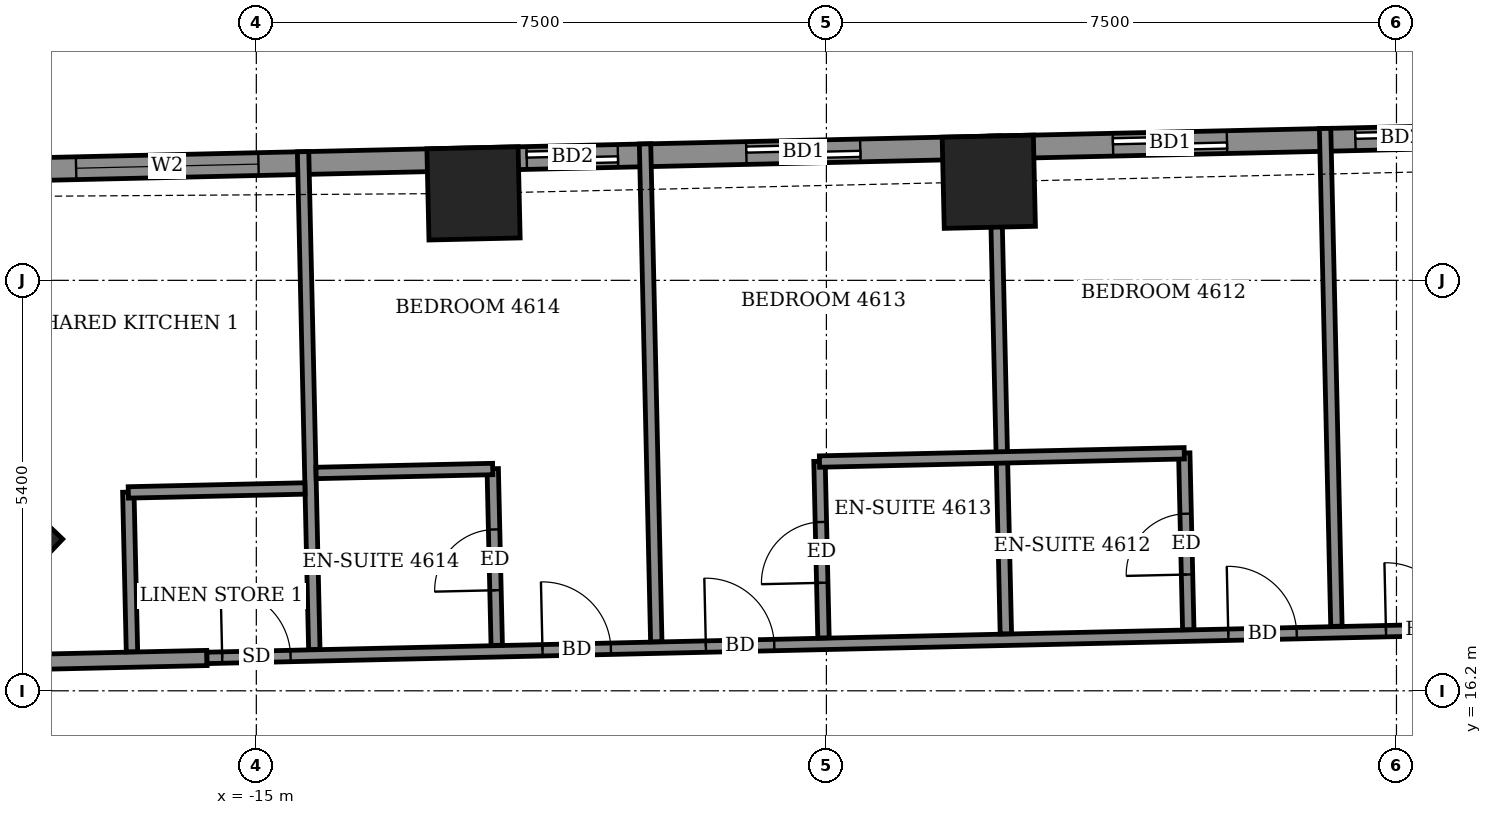
"""IFC4 building model, lengths in metres.
Left out: names, types, materials, properties, quantities, classifications, styles, units other than length and angle.
Written with IfcOpenShell. Run it as: python <this file> out.ifc"""

import sys

from ifc_helpers import new_model, si_unit, direction, frame, frame_2d, origin, origin_2d, place, context, subcontext, project, spatial, rectangle, extrude, element, fill, save


model = new_model("IFC4")
c1 = context("Model", 3, precision=1e-05, world=origin(), true_north=direction((0.0, 1.0)))
c2 = subcontext(c1, "Body", "Model", "MODEL_VIEW")
j1 = project(units=[si_unit("LENGTHUNIT", "METRE"), si_unit("PLANEANGLEUNIT", "RADIAN")], contexts=[c1])
p1 = place(None, origin())
s1 = spatial("IfcSite", under=j1, at=p1, CompositionType="ELEMENT")
p2 = place(p1, origin())
s2 = spatial("IfcBuilding", under=s1, at=p2, CompositionType="ELEMENT")
p3 = place(p2, frame((0.0, 0.0, 182.5)))
s3 = spatial("IfcBuildingStorey", under=s2, at=p3, CompositionType="ELEMENT", Elevation=182.5)
for number, where, z_axis, x_axis in (
    (1, (-5.364, 22.897, -0.55), (0.0, 0.0, 1.0), (-1.0, -0.023, 0.0)),
    (2, (-12.142, 22.744, -0.55), (0.0, 0.0, 1.0), (-1.0, -0.023, 0.0)),
    (3, (-18.396, 18.177, -0.55), (0.0, 0.0, 1.0), (-0.691, -0.723, 0.0)),
):
    element("IfcColumn", number, at=place(p3, frame(where, z_axis=z_axis, x_axis=x_axis)), inside=s3, PredefinedType="COLUMN", context=c2, shape_type="SweptSolid", body=[
        extrude(rectangle(XDim=1.2, YDim=1.2, at=origin_2d()), origin(), (0.0, 0.0, 1.0), 3.6),
    ])
p4 = place(p3, frame((21.589, 23.959, 0.0), z_axis=(0.0, 0.0, 1.0), x_axis=(-0.999742671382, -0.022684598702, 0.0)))
e4 = element("IfcWall", 4, at=p4, inside=s3, PredefinedType="SOLIDWALL", context=c2, shape_type="SweptSolid", body=[
    extrude(rectangle(XDim=40.381, YDim=0.3, at=frame_2d((20.19, 0.0))), origin(), (0.0, 0.0, 1.0), 3.05),
])
p5 = place(p4, frame((1.853, 0.0, 0.0)))
e5 = element("IfcOpeningElement", 5, at=p5, cuts=e4, PredefinedType="OPENING", context=c2, shape_type="SweptSolid", body=[
    extrude(rectangle(XDim=1.5, YDim=2.4, at=frame_2d((0.75, 1.2))), frame((0.0, 0.16, 0.0), z_axis=(0.0, -1.0, 0.0), x_axis=(1.0, 0.0, 0.0)), (0.0, 0.0, 1.0), 0.32),
])
p6 = place(p4, frame((7.38, 0.0, 0.0)))
e6 = element("IfcOpeningElement", 6, at=p6, cuts=e4, PredefinedType="OPENING", context=c2, shape_type="SweptSolid", body=[
    extrude(rectangle(XDim=1.2, YDim=2.4, at=frame_2d((0.6, 1.2))), frame((0.0, 0.16, 0.0), z_axis=(0.0, -1.0, 0.0), x_axis=(1.0, 0.0, 0.0)), (0.0, 0.0, 1.0), 0.32),
])
p7 = place(p4, frame((10.27, 0.0, 0.0)))
e7 = element("IfcOpeningElement", 7, at=p7, cuts=e4, PredefinedType="OPENING", context=c2, shape_type="SweptSolid", body=[
    extrude(rectangle(XDim=1.5, YDim=2.4, at=frame_2d((0.75, 1.2))), frame((0.0, 0.16, 0.0), z_axis=(0.0, -1.0, 0.0), x_axis=(1.0, 0.0, 0.0)), (0.0, 0.0, 1.0), 0.32),
])
p8 = place(p4, frame((15.095, 0.0, 0.0)))
e8 = element("IfcOpeningElement", 8, at=p8, cuts=e4, PredefinedType="OPENING", context=c2, shape_type="SweptSolid", body=[
    extrude(rectangle(XDim=1.5, YDim=2.4, at=frame_2d((0.75, 1.2))), frame((0.0, 0.16, 0.0), z_axis=(0.0, -1.0, 0.0), x_axis=(1.0, 0.0, 0.0)), (0.0, 0.0, 1.0), 0.32),
])
p9 = place(p4, frame((20.935, 0.0, 0.0)))
e9 = element("IfcOpeningElement", 9, at=p9, cuts=e4, PredefinedType="OPENING", context=c2, shape_type="SweptSolid", body=[
    extrude(rectangle(XDim=1.2, YDim=2.4, at=frame_2d((0.6, 1.2))), frame((0.0, 0.16, 0.0), z_axis=(0.0, -1.0, 0.0), x_axis=(1.0, 0.0, 0.0)), (0.0, 0.0, 1.0), 0.32),
])
p10 = place(p4, frame((23.825, 0.0, 0.0)))
e10 = element("IfcOpeningElement", 10, at=p10, cuts=e4, PredefinedType="OPENING", context=c2, shape_type="SweptSolid", body=[
    extrude(rectangle(XDim=1.5, YDim=2.4, at=frame_2d((0.75, 1.2))), frame((0.0, 0.16, 0.0), z_axis=(0.0, -1.0, 0.0), x_axis=(1.0, 0.0, 0.0)), (0.0, 0.0, 1.0), 0.32),
])
p11 = place(p4, frame((28.65, 0.0, 0.0)))
e11 = element("IfcOpeningElement", 11, at=p11, cuts=e4, PredefinedType="OPENING", context=c2, shape_type="SweptSolid", body=[
    extrude(rectangle(XDim=1.5, YDim=2.4, at=frame_2d((0.75, 1.2))), frame((0.0, 0.16, 0.0), z_axis=(0.0, -1.0, 0.0), x_axis=(1.0, 0.0, 0.0)), (0.0, 0.0, 1.0), 0.32),
])
p12 = place(p4, frame((31.84, 0.0, 0.0)))
e12 = element("IfcOpeningElement", 12, at=p12, cuts=e4, PredefinedType="OPENING", context=c2, shape_type="SweptSolid", body=[
    extrude(rectangle(XDim=1.2, YDim=2.4, at=frame_2d((0.6, 1.2))), frame((0.0, 0.16, 0.0), z_axis=(0.0, -1.0, 0.0), x_axis=(1.0, 0.0, 0.0)), (0.0, 0.0, 1.0), 0.32),
])
p13 = place(p4, frame((36.57, 0.0, 0.9)))
e13 = element("IfcOpeningElement", 13, at=p13, cuts=e4, PredefinedType="OPENING", context=c2, shape_type="SweptSolid", body=[
    extrude(rectangle(XDim=2.4, YDim=1.5, at=frame_2d((1.2, 0.75))), frame((0.0, 0.16, 0.0), z_axis=(0.0, -1.0, 0.0), x_axis=(1.0, 0.0, 0.0)), (0.0, 0.0, 1.0), 0.32),
])
p14 = place(p3, frame((-21.983, 16.489, 0.0), z_axis=(0.0, 0.0, 1.0), x_axis=(0.999744930163, 0.022584831499, 0.0)))
e14 = element("IfcWall", 14, at=p14, inside=s3, PredefinedType="PARTITIONING", context=c2, shape_type="SweptSolid", body=[
    extrude(rectangle(XDim=6.335, YDim=0.2, at=frame_2d((3.167, 0.0))), origin(), (0.0, 0.0, 1.0), 3.05),
])
p15 = place(p14, frame((1.475, 0.0, 0.0)))
e15 = element("IfcOpeningElement", 15, at=p15, cuts=e14, PredefinedType="OPENING", context=c2, shape_type="SweptSolid", body=[
    extrude(rectangle(XDim=1.0, YDim=2.1, at=frame_2d((0.5, 1.05))), frame((0.0, 0.11, 0.0), z_axis=(0.0, -1.0, 0.0), x_axis=(1.0, 0.0, 0.0)), (0.0, 0.0, 1.0), 0.22),
])
p16 = place(p3, frame((-15.649, 16.633, 0.0), z_axis=(0.0, 0.0, 1.0), x_axis=(0.999743261737, 0.022658565952, 0.0)))
e16 = element("IfcWall", 16, at=p16, inside=s3, PredefinedType="PARTITIONING", context=c2, shape_type="SweptSolid", body=[
    extrude(rectangle(XDim=30.536, YDim=0.15, at=frame_2d((15.268, 0.0))), origin(), (0.0, 0.0, 1.0), 3.05),
])
p17 = place(p16, frame((24.44, 0.0, 0.0)))
e17 = element("IfcOpeningElement", 17, at=p17, cuts=e16, PredefinedType="OPENING", context=c2, shape_type="SweptSolid", body=[
    extrude(rectangle(XDim=0.9, YDim=2.1, at=frame_2d((0.45, 1.05))), frame((0.0, 0.085, 0.0), z_axis=(0.0, -1.0, 0.0), x_axis=(1.0, 0.0, 0.0)), (0.0, 0.0, 1.0), 0.17),
])
p18 = place(p16, frame((22.365, 0.0, 0.0)))
e18 = element("IfcOpeningElement", 18, at=p18, cuts=e16, PredefinedType="OPENING", context=c2, shape_type="SweptSolid", body=[
    extrude(rectangle(XDim=0.9, YDim=2.1, at=frame_2d((0.45, 1.05))), frame((0.0, 0.085, 0.0), z_axis=(0.0, -1.0, 0.0), x_axis=(1.0, 0.0, 0.0)), (0.0, 0.0, 1.0), 0.17),
])
p19 = place(p16, frame((15.515, 0.0, 0.0)))
e19 = element("IfcOpeningElement", 19, at=p19, cuts=e16, PredefinedType="OPENING", context=c2, shape_type="SweptSolid", body=[
    extrude(rectangle(XDim=0.9, YDim=2.1, at=frame_2d((0.45, 1.05))), frame((0.0, 0.085, 0.0), z_axis=(0.0, -1.0, 0.0), x_axis=(1.0, 0.0, 0.0)), (0.0, 0.0, 1.0), 0.17),
])
p20 = place(p16, frame((13.44, 0.0, 0.0)))
e20 = element("IfcOpeningElement", 20, at=p20, cuts=e16, PredefinedType="OPENING", context=c2, shape_type="SweptSolid", body=[
    extrude(rectangle(XDim=0.9, YDim=2.1, at=frame_2d((0.45, 1.05))), frame((0.0, 0.085, 0.0), z_axis=(0.0, -1.0, 0.0), x_axis=(1.0, 0.0, 0.0)), (0.0, 0.0, 1.0), 0.17),
])
p21 = place(p16, frame((6.565, 0.0, 0.0)))
e21 = element("IfcOpeningElement", 21, at=p21, cuts=e16, PredefinedType="OPENING", context=c2, shape_type="SweptSolid", body=[
    extrude(rectangle(XDim=0.9, YDim=2.1, at=frame_2d((0.45, 1.05))), frame((0.0, 0.085, 0.0), z_axis=(0.0, -1.0, 0.0), x_axis=(1.0, 0.0, 0.0)), (0.0, 0.0, 1.0), 0.17),
])
p22 = place(p16, frame((4.415, 0.0, 0.0)))
e22 = element("IfcOpeningElement", 22, at=p22, cuts=e16, PredefinedType="OPENING", context=c2, shape_type="SweptSolid", body=[
    extrude(rectangle(XDim=0.9, YDim=2.1, at=frame_2d((0.45, 1.05))), frame((0.0, 0.085, 0.0), z_axis=(0.0, -1.0, 0.0), x_axis=(1.0, 0.0, 0.0)), (0.0, 0.0, 1.0), 0.17),
])
p23 = place(p16, frame((0.2, 0.0, 0.0)))
e23 = element("IfcOpeningElement", 23, at=p23, cuts=e16, PredefinedType="OPENING", context=c2, shape_type="SweptSolid", body=[
    extrude(rectangle(XDim=0.9, YDim=2.1, at=frame_2d((0.45, 1.05))), frame((0.0, 0.085, 0.0), z_axis=(0.0, -1.0, 0.0), x_axis=(1.0, 0.0, 0.0)), (0.0, 0.0, 1.0), 0.17),
])
p24 = place(p3, frame((-16.636, 16.714, 0.0), z_axis=(0.0, 0.0, 1.0), x_axis=(-0.022898307927, 0.999737799372, 0.0)))
e24 = element("IfcWall", 24, at=p24, inside=s3, PredefinedType="PARTITIONING", context=c2, shape_type="SweptSolid", body=[
    extrude(rectangle(XDim=2.1, YDim=0.15, at=frame_2d((1.05, 0.0))), origin(), (0.0, 0.0, 1.0), 3.05),
])
p25 = place(p3, frame((-14.237, 16.744, 0.0), z_axis=(0.0, 0.0, 1.0), x_axis=(-0.022585104341, 0.999744923999, 0.0)))
e25 = element("IfcWall", 25, at=p25, inside=s3, PredefinedType="PARTITIONING", context=c2, shape_type="SweptSolid", body=[
    extrude(rectangle(XDim=6.551, YDim=0.15, at=frame_2d((3.275, 0.0))), origin(), (0.0, 0.0, 1.0), 2.55),
])
p26 = place(p3, frame((-11.837, 16.798, 0.0), z_axis=(0.0, 0.0, 1.0), x_axis=(-0.02279059109, 0.999740260747, 0.0)))
e26 = element("IfcWall", 26, at=p26, inside=s3, PredefinedType="PARTITIONING", context=c2, shape_type="SweptSolid", body=[
    extrude(rectangle(XDim=2.324, YDim=0.15, at=frame_2d((1.162, 0.0))), origin(), (0.0, 0.0, 1.0), 3.05),
])
p27 = place(p26, frame((0.725, 0.0, 0.0)))
e27 = element("IfcOpeningElement", 27, at=p27, cuts=e26, PredefinedType="OPENING", context=c2, shape_type="SweptSolid", body=[
    extrude(rectangle(XDim=0.8, YDim=2.1, at=frame_2d((0.4, 1.05))), frame((0.0, 0.085, 0.0), z_axis=(0.0, -1.0, 0.0), x_axis=(1.0, 0.0, 0.0)), (0.0, 0.0, 1.0), 0.17),
])
p28 = place(p3, frame((-9.738, 16.846, 0.0), z_axis=(0.0, 0.0, 1.0), x_axis=(-0.022585104341, 0.999744923999, 0.0)))
e28 = element("IfcWall", 28, at=p28, inside=s3, PredefinedType="PARTITIONING", context=c2, shape_type="SweptSolid", body=[
    extrude(rectangle(XDim=6.551, YDim=0.15, at=frame_2d((3.275, 0.0))), origin(), (0.0, 0.0, 1.0), 2.55),
])
p29 = place(p3, frame((-7.538, 16.896, 0.0), z_axis=(0.0, 0.0, 1.0), x_axis=(-0.02279059109, 0.999740260747, 0.0)))
e29 = element("IfcWall", 29, at=p29, inside=s3, PredefinedType="PARTITIONING", context=c2, shape_type="SweptSolid", body=[
    extrude(rectangle(XDim=2.324, YDim=0.15, at=frame_2d((1.162, 0.0))), origin(), (0.0, 0.0, 1.0), 3.05),
])
p30 = place(p29, frame((0.725, 0.0, 0.0)))
e30 = element("IfcOpeningElement", 30, at=p30, cuts=e29, PredefinedType="OPENING", context=c2, shape_type="SweptSolid", body=[
    extrude(rectangle(XDim=0.8, YDim=2.1, at=frame_2d((0.4, 1.05))), frame((0.0, 0.085, 0.0), z_axis=(0.0, -1.0, 0.0), x_axis=(1.0, 0.0, 0.0)), (0.0, 0.0, 1.0), 0.17),
])
p31 = place(p3, frame((-5.139, 16.95, 0.0), z_axis=(0.0, 0.0, 1.0), x_axis=(-0.022622354432, 0.999744081793, 0.0)))
e31 = element("IfcWall", 31, at=p31, inside=s3, PredefinedType="PARTITIONING", context=c2, shape_type="SweptSolid", body=[
    extrude(rectangle(XDim=6.551, YDim=0.15, at=frame_2d((3.275, 0.0))), origin(), (0.0, 0.0, 1.0), 3.05),
])
p32 = place(p3, frame((-2.739, 17.005, 0.0), z_axis=(0.0, 0.0, 1.0), x_axis=(-0.022788198363, 0.99974031529, 0.0)))
e32 = element("IfcWall", 32, at=p32, inside=s3, PredefinedType="PARTITIONING", context=c2, shape_type="SweptSolid", body=[
    extrude(rectangle(XDim=2.325, YDim=0.15, at=frame_2d((1.162, 0.0))), origin(), (0.0, 0.0, 1.0), 3.05),
])
p33 = place(p32, frame((0.725, 0.0, 0.0)))
e33 = element("IfcOpeningElement", 33, at=p33, cuts=e32, PredefinedType="OPENING", context=c2, shape_type="SweptSolid", body=[
    extrude(rectangle(XDim=0.8, YDim=2.1, at=frame_2d((0.4, 1.05))), frame((0.0, 0.085, 0.0), z_axis=(0.0, -1.0, 0.0), x_axis=(1.0, 0.0, 0.0)), (0.0, 0.0, 1.0), 0.17),
])
p34 = place(p3, frame((-0.79, 17.049, 0.0), z_axis=(0.0, 0.0, 1.0), x_axis=(-0.022734951231, 0.999741527592, 0.0)))
e34 = element("IfcWall", 34, at=p34, inside=s3, PredefinedType="PARTITIONING", context=c2, shape_type="SweptSolid", body=[
    extrude(rectangle(XDim=6.551, YDim=0.15, at=frame_2d((3.275, 0.0))), origin(), (0.0, 0.0, 1.0), 2.55),
])
p35 = place(p3, frame((-16.684, 18.81, 0.0), z_axis=(0.0, 0.0, 1.0), x_axis=(0.999749744571, 0.022370700241, 0.0)))
e35 = element("IfcWall", 35, at=p35, inside=s3, PredefinedType="PARTITIONING", context=c2, shape_type="SweptSolid", body=[
    extrude(rectangle(XDim=2.324, YDim=0.15, at=frame_2d((1.162, 0.0))), origin(), (0.0, 0.0, 1.0), 3.05),
])
p36 = place(p3, frame((-14.214, 19.066, 0.0), z_axis=(0.0, 0.0, 1.0), x_axis=(0.999749797124, 0.022368351553, 0.0)))
e36 = element("IfcWall", 36, at=p36, inside=s3, PredefinedType="PARTITIONING", context=c2, shape_type="SweptSolid", body=[
    extrude(rectangle(XDim=2.325, YDim=0.15, at=frame_2d((1.162, 0.0))), origin(), (0.0, 0.0, 1.0), 3.05),
])
p37 = place(p3, frame((-7.591, 19.216, 0.0), z_axis=(0.0, 0.0, 1.0), x_axis=(0.999742701292, 0.022683280499, 0.0)))
e37 = element("IfcWall", 37, at=p37, inside=s3, PredefinedType="PARTITIONING", context=c2, shape_type="SweptSolid", body=[
    extrude(rectangle(XDim=4.8, YDim=0.15, at=frame_2d((2.4, 0.0))), origin(), (0.0, 0.0, 1.0), 3.05),
])
p38 = place(p9, origin())
e38 = element("IfcDoor", 38, at=p38, inside=s3, OperationType="SLIDING_TO_LEFT", PredefinedType="DOOR", context=c2, shape_type="SweptSolid", body=[
    extrude(rectangle(XDim=1.2, YDim=2.4, at=frame_2d((0.6, 1.2))), frame((0.0, 0.025, 0.0), z_axis=(0.0, -1.0, 0.0), x_axis=(1.0, 0.0, 0.0)), (0.0, 0.0, 1.0), 0.05),
])
fill(e9, e38)
p39 = place(p10, origin())
e39 = element("IfcDoor", 39, at=p39, inside=s3, OperationType="SLIDING_TO_LEFT", PredefinedType="DOOR", context=c2, shape_type="SweptSolid", body=[
    extrude(rectangle(XDim=1.5, YDim=2.4, at=frame_2d((0.75, 1.2))), frame((0.0, 0.025, 0.0), z_axis=(0.0, -1.0, 0.0), x_axis=(1.0, 0.0, 0.0)), (0.0, 0.0, 1.0), 0.05),
])
fill(e10, e39)
p40 = place(p11, origin())
e40 = element("IfcDoor", 40, at=p40, inside=s3, OperationType="SLIDING_TO_LEFT", PredefinedType="DOOR", context=c2, shape_type="SweptSolid", body=[
    extrude(rectangle(XDim=1.5, YDim=2.4, at=frame_2d((0.75, 1.2))), frame((0.0, 0.025, 0.0), z_axis=(0.0, -1.0, 0.0), x_axis=(1.0, 0.0, 0.0)), (0.0, 0.0, 1.0), 0.05),
])
fill(e11, e40)
p41 = place(p12, origin())
e41 = element("IfcDoor", 41, at=p41, inside=s3, OperationType="SLIDING_TO_LEFT", PredefinedType="DOOR", context=c2, shape_type="SweptSolid", body=[
    extrude(rectangle(XDim=1.2, YDim=2.4, at=frame_2d((0.6, 1.2))), frame((0.0, 0.025, 0.0), z_axis=(0.0, -1.0, 0.0), x_axis=(1.0, 0.0, 0.0)), (0.0, 0.0, 1.0), 0.05),
])
fill(e12, e41)
p42 = place(p13, origin())
e42 = element("IfcWindow", 42, at=p42, inside=s3, PartitioningType="DOUBLE_PANEL_VERTICAL", PredefinedType="WINDOW", context=c2, shape_type="SweptSolid", body=[
    extrude(rectangle(XDim=2.4, YDim=1.5, at=frame_2d((1.2, 0.75))), frame((0.0, 0.03, 0.0), z_axis=(0.0, -1.0, 0.0), x_axis=(1.0, 0.0, 0.0)), (0.0, 0.0, 1.0), 0.06),
])
fill(e13, e42)
p43 = place(p19, origin())
e43 = element("IfcDoor", 43, at=p43, inside=s3, OperationType="SINGLE_SWING_LEFT", PredefinedType="DOOR", context=c2, shape_type="SweptSolid", body=[
    extrude(rectangle(XDim=0.9, YDim=2.1, at=frame_2d((0.45, 1.05))), frame((0.0, 0.025, 0.0), z_axis=(0.0, -1.0, 0.0), x_axis=(1.0, 0.0, 0.0)), (0.0, 0.0, 1.0), 0.05),
])
fill(e19, e43)
p44 = place(p20, origin())
e44 = element("IfcDoor", 44, at=p44, inside=s3, OperationType="SINGLE_SWING_RIGHT", PredefinedType="DOOR", context=c2, shape_type="SweptSolid", body=[
    extrude(rectangle(XDim=0.9, YDim=2.1, at=frame_2d((0.45, 1.05))), frame((0.0, 0.025, 0.0), z_axis=(0.0, -1.0, 0.0), x_axis=(1.0, 0.0, 0.0)), (0.0, 0.0, 1.0), 0.05),
])
fill(e20, e44)
p45 = place(p33, origin())
e45 = element("IfcDoor", 45, at=p45, inside=s3, OperationType="SINGLE_SWING_RIGHT", PredefinedType="DOOR", context=c2, shape_type="SweptSolid", body=[
    extrude(rectangle(XDim=0.8, YDim=2.1, at=frame_2d((0.4, 1.05))), frame((0.0, 0.025, 0.0), z_axis=(0.0, -1.0, 0.0), x_axis=(1.0, 0.0, 0.0)), (0.0, 0.0, 1.0), 0.05),
])
fill(e33, e45)
p46 = place(p21, origin())
e46 = element("IfcDoor", 46, at=p46, inside=s3, OperationType="SINGLE_SWING_LEFT", PredefinedType="DOOR", context=c2, shape_type="SweptSolid", body=[
    extrude(rectangle(XDim=0.9, YDim=2.1, at=frame_2d((0.45, 1.05))), frame((0.0, 0.025, 0.0), z_axis=(0.0, -1.0, 0.0), x_axis=(1.0, 0.0, 0.0)), (0.0, 0.0, 1.0), 0.05),
])
fill(e21, e46)
p47 = place(p30, origin())
e47 = element("IfcDoor", 47, at=p47, inside=s3, OperationType="SINGLE_SWING_LEFT", PredefinedType="DOOR", context=c2, shape_type="SweptSolid", body=[
    extrude(rectangle(XDim=0.8, YDim=2.1, at=frame_2d((0.4, 1.05))), frame((0.0, 0.025, 0.0), z_axis=(0.0, -1.0, 0.0), x_axis=(1.0, 0.0, 0.0)), (0.0, 0.0, 1.0), 0.05),
])
fill(e30, e47)
p48 = place(p22, origin())
e48 = element("IfcDoor", 48, at=p48, inside=s3, OperationType="SINGLE_SWING_RIGHT", PredefinedType="DOOR", context=c2, shape_type="SweptSolid", body=[
    extrude(rectangle(XDim=0.9, YDim=2.1, at=frame_2d((0.45, 1.05))), frame((0.0, 0.025, 0.0), z_axis=(0.0, -1.0, 0.0), x_axis=(1.0, 0.0, 0.0)), (0.0, 0.0, 1.0), 0.05),
])
fill(e22, e48)
p49 = place(p27, origin())
e49 = element("IfcDoor", 49, at=p49, inside=s3, OperationType="SINGLE_SWING_RIGHT", PredefinedType="DOOR", context=c2, shape_type="SweptSolid", body=[
    extrude(rectangle(XDim=0.8, YDim=2.1, at=frame_2d((0.4, 1.05))), frame((0.0, 0.025, 0.0), z_axis=(0.0, -1.0, 0.0), x_axis=(1.0, 0.0, 0.0)), (0.0, 0.0, 1.0), 0.05),
])
fill(e27, e49)
p50 = place(p23, origin())
e50 = element("IfcDoor", 50, at=p50, inside=s3, OperationType="SINGLE_SWING_RIGHT", PredefinedType="DOOR", context=c2, shape_type="SweptSolid", body=[
    extrude(rectangle(XDim=0.9, YDim=2.1, at=frame_2d((0.45, 1.05))), frame((0.0, 0.025, 0.0), z_axis=(0.0, -1.0, 0.0), x_axis=(1.0, 0.0, 0.0)), (0.0, 0.0, 1.0), 0.05),
])
fill(e23, e50)
save(model, sys.argv[1])
